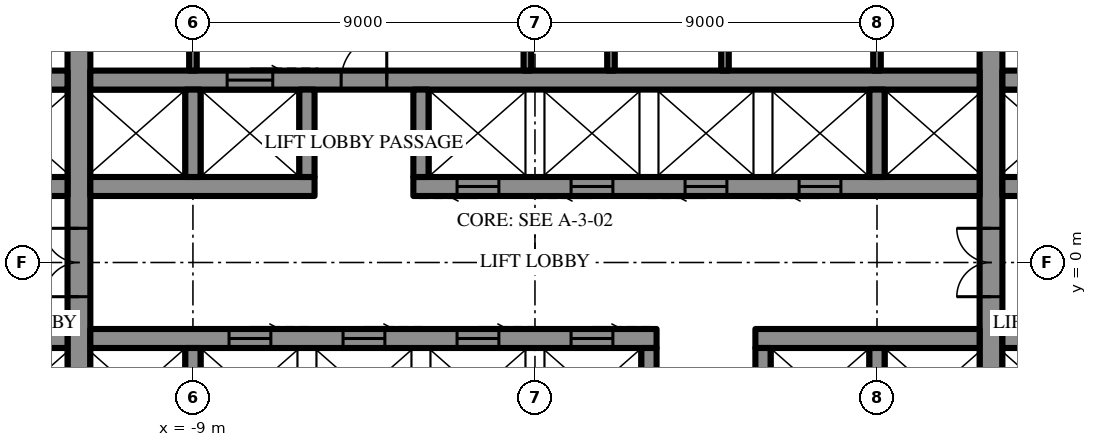
"""IFC4 building model, lengths in metres.
Left out: names, types, materials, properties, quantities, classifications, styles, units other than length and angle.
Written with IfcOpenShell. Run it as: python <this file> out.ifc"""

import sys

from ifc_helpers import new_model, si_unit, direction, frame, frame_2d, origin, place, context, subcontext, project, spatial, rectangle, extrude, element, fill, save


model = new_model("IFC4")
c1 = context("Model", 3, precision=1e-05, world=origin(), true_north=direction((0.0, 1.0)))
c2 = subcontext(c1, "Body", "Model", "MODEL_VIEW")
j1 = project(units=[si_unit("LENGTHUNIT", "METRE"), si_unit("PLANEANGLEUNIT", "RADIAN")], contexts=[c1])
p1 = place(None, origin())
s1 = spatial("IfcSite", under=j1, at=p1, CompositionType="ELEMENT")
p2 = place(p1, origin())
s2 = spatial("IfcBuilding", under=s1, at=p2, CompositionType="ELEMENT")
p3 = place(p2, frame((0.0, 0.0, 119.5)))
s3 = spatial("IfcBuildingStorey", under=s2, at=p3, CompositionType="ELEMENT", Elevation=119.5)
p4 = place(p3, frame((12.0, -10.7, 0.0), z_axis=(0.0, 0.0, 1.0), x_axis=(0.0, 1.0, 0.0)))
e1 = element("IfcWall", 1, at=p4, inside=s3, PredefinedType="SHEAR", context=c2, shape_type="SweptSolid", body=[
    extrude(rectangle(XDim=21.4, YDim=0.6, at=frame_2d((10.7, 0.0))), origin(), (0.0, 0.0, 1.0), 4.2),
])
p5 = place(p4, frame((9.8, 0.0, 0.0)))
e2 = element("IfcOpeningElement", 2, at=p5, cuts=e1, PredefinedType="OPENING", context=c2, shape_type="SweptSolid", body=[
    extrude(rectangle(XDim=1.8, YDim=2.4, at=frame_2d((0.9, 1.2))), frame((0.0, 0.31, 0.0), z_axis=(0.0, -1.0, 0.0), x_axis=(1.0, 0.0, 0.0)), (0.0, 0.0, 1.0), 0.62),
])
p6 = place(p3, frame((-12.0, -10.7, 0.0), z_axis=(0.0, 0.0, 1.0), x_axis=(0.0, 1.0, 0.0)))
e3 = element("IfcWall", 3, at=p6, inside=s3, PredefinedType="SHEAR", context=c2, shape_type="SweptSolid", body=[
    extrude(rectangle(XDim=21.4, YDim=0.6, at=frame_2d((10.7, 0.0))), origin(), (0.0, 0.0, 1.0), 4.2),
])
p7 = place(p6, frame((9.8, 0.0, 0.0)))
e4 = element("IfcOpeningElement", 4, at=p7, cuts=e3, PredefinedType="OPENING", context=c2, shape_type="SweptSolid", body=[
    extrude(rectangle(XDim=1.8, YDim=2.4, at=frame_2d((0.9, 1.2))), frame((0.0, 0.31, 0.0), z_axis=(0.0, -1.0, 0.0), x_axis=(1.0, 0.0, 0.0)), (0.0, 0.0, 1.0), 0.62),
])
p8 = place(p3, frame((-14.7, 2.0, 0.0), z_axis=(0.0, 0.0, 1.0), x_axis=(1.0, 0.0, 0.0)))
e5 = element("IfcWall", 5, at=p8, inside=s3, PredefinedType="SHEAR", context=c2, shape_type="SweptSolid", body=[
    extrude(rectangle(XDim=2.4, YDim=0.5, at=frame_2d((1.2, 0.0))), origin(), (0.0, 0.0, 1.0), 4.2),
])
p9 = place(p3, frame((-11.7, 2.0, 0.0), z_axis=(0.0, 0.0, 1.0), x_axis=(1.0, 0.0, 0.0)))
e6 = element("IfcWall", 6, at=p9, inside=s3, PredefinedType="SHEAR", context=c2, shape_type="SweptSolid", body=[
    extrude(rectangle(XDim=5.9, YDim=0.5, at=frame_2d((2.95, 0.0))), origin(), (0.0, 0.0, 1.0), 4.2),
])
p10 = place(p3, frame((-3.2, 2.0, 0.0), z_axis=(0.0, 0.0, 1.0), x_axis=(1.0, 0.0, 0.0)))
e7 = element("IfcWall", 7, at=p10, inside=s3, PredefinedType="SHEAR", context=c2, shape_type="SweptSolid", body=[
    extrude(rectangle(XDim=14.9, YDim=0.5, at=frame_2d((7.45, 0.0))), origin(), (0.0, 0.0, 1.0), 4.2),
])
p11 = place(p10, frame((1.15, 0.0, 0.0)))
e8 = element("IfcOpeningElement", 8, at=p11, cuts=e7, PredefinedType="OPENING", context=c2, shape_type="SweptSolid", body=[
    extrude(rectangle(XDim=1.1, YDim=2.2, at=frame_2d((0.55, 1.1))), frame((0.0, 0.26, 0.0), z_axis=(0.0, -1.0, 0.0), x_axis=(1.0, 0.0, 0.0)), (0.0, 0.0, 1.0), 0.52),
])
p12 = place(p10, frame((4.15, 0.0, 0.0)))
e9 = element("IfcOpeningElement", 9, at=p12, cuts=e7, PredefinedType="OPENING", context=c2, shape_type="SweptSolid", body=[
    extrude(rectangle(XDim=1.1, YDim=2.2, at=frame_2d((0.55, 1.1))), frame((0.0, 0.26, 0.0), z_axis=(0.0, -1.0, 0.0), x_axis=(1.0, 0.0, 0.0)), (0.0, 0.0, 1.0), 0.52),
])
p13 = place(p10, frame((7.15, 0.0, 0.0)))
e10 = element("IfcOpeningElement", 10, at=p13, cuts=e7, PredefinedType="OPENING", context=c2, shape_type="SweptSolid", body=[
    extrude(rectangle(XDim=1.1, YDim=2.2, at=frame_2d((0.55, 1.1))), frame((0.0, 0.26, 0.0), z_axis=(0.0, -1.0, 0.0), x_axis=(1.0, 0.0, 0.0)), (0.0, 0.0, 1.0), 0.52),
])
p14 = place(p10, frame((10.15, 0.0, 0.0)))
e11 = element("IfcOpeningElement", 11, at=p14, cuts=e7, PredefinedType="OPENING", context=c2, shape_type="SweptSolid", body=[
    extrude(rectangle(XDim=1.1, YDim=2.2, at=frame_2d((0.55, 1.1))), frame((0.0, 0.26, 0.0), z_axis=(0.0, -1.0, 0.0), x_axis=(1.0, 0.0, 0.0)), (0.0, 0.0, 1.0), 0.52),
])
for number, where, z_axis, x_axis in (
    (12, (12.3, 2.0, 0.0), (0.0, 0.0, 1.0), (1.0, 0.0, 0.0)),
    (13, (-14.7, 4.8, 0.0), (0.0, 0.0, 1.0), (1.0, 0.0, 0.0)),
):
    element("IfcWall", number, at=place(p3, frame(where, z_axis=z_axis, x_axis=x_axis)), inside=s3, PredefinedType="SHEAR", context=c2, shape_type="SweptSolid", body=[
        extrude(rectangle(XDim=2.4, YDim=0.5, at=frame_2d((1.2, 0.0))), origin(), (0.0, 0.0, 1.0), 4.2),
    ])
p15 = place(p3, frame((-11.7, 4.8, 0.0), z_axis=(0.0, 0.0, 1.0), x_axis=(1.0, 0.0, 0.0)))
e14 = element("IfcWall", 14, at=p15, inside=s3, PredefinedType="SHEAR", context=c2, shape_type="SweptSolid", body=[
    extrude(rectangle(XDim=23.4, YDim=0.5, at=frame_2d((11.7, 0.0))), origin(), (0.0, 0.0, 1.0), 4.2),
])
p16 = place(p15, frame((6.6, 0.0, 0.0)))
e15 = element("IfcOpeningElement", 15, at=p16, cuts=e14, PredefinedType="OPENING", context=c2, shape_type="SweptSolid", body=[
    extrude(rectangle(XDim=1.2, YDim=2.2, at=frame_2d((0.6, 1.1))), frame((0.0, 0.26, 0.0), z_axis=(0.0, -1.0, 0.0), x_axis=(1.0, 0.0, 0.0)), (0.0, 0.0, 1.0), 0.52),
])
p17 = place(p15, frame((3.6, 0.0, 0.0)))
e16 = element("IfcOpeningElement", 16, at=p17, cuts=e14, PredefinedType="OPENING", context=c2, shape_type="SweptSolid", body=[
    extrude(rectangle(XDim=1.2, YDim=2.2, at=frame_2d((0.6, 1.1))), frame((0.0, 0.26, 0.0), z_axis=(0.0, -1.0, 0.0), x_axis=(1.0, 0.0, 0.0)), (0.0, 0.0, 1.0), 0.52),
])
p18 = place(p3, frame((12.3, 4.8, 0.0), z_axis=(0.0, 0.0, 1.0), x_axis=(1.0, 0.0, 0.0)))
e17 = element("IfcWall", 17, at=p18, inside=s3, PredefinedType="SHEAR", context=c2, shape_type="SweptSolid", body=[
    extrude(rectangle(XDim=2.4, YDim=0.5, at=frame_2d((1.2, 0.0))), origin(), (0.0, 0.0, 1.0), 4.2),
])
for number, where, z_axis, x_axis in (
    (18, (-9.0, 2.25, 0.0), (0.0, 0.0, 1.0), (0.0, 1.0, 0.0)),
    (19, (-6.0, 2.25, 0.0), (0.0, 0.0, 1.0), (0.0, 1.0, 0.0)),
    (20, (-3.0, 2.25, 0.0), (0.0, 0.0, 1.0), (0.0, 1.0, 0.0)),
    (21, (9.0, 2.25, 0.0), (0.0, 0.0, 1.0), (0.0, 1.0, 0.0)),
):
    element("IfcWall", number, at=place(p3, frame(where, z_axis=z_axis, x_axis=x_axis)), inside=s3, PredefinedType="SHEAR", context=c2, shape_type="SweptSolid", body=[
        extrude(rectangle(XDim=2.3, YDim=0.4, at=frame_2d((1.15, 0.0))), origin(), (0.0, 0.0, 1.0), 4.2),
    ])
p19 = place(p3, frame((-0.2, 5.05, 0.0), z_axis=(0.0, 0.0, 1.0), x_axis=(0.0, 1.0, 0.0)))
e22 = element("IfcWall", 22, at=p19, inside=s3, PredefinedType="SHEAR", context=c2, shape_type="SweptSolid", body=[
    extrude(rectangle(XDim=5.65, YDim=0.2, at=frame_2d((2.825, 0.0))), origin(), (0.0, 0.0, 1.0), 4.2),
])
p20 = place(p3, frame((14.7, -2.0, 0.0), z_axis=(0.0, 0.0, 1.0), x_axis=(-1.0, 0.0, 0.0)))
e23 = element("IfcWall", 23, at=p20, inside=s3, PredefinedType="SHEAR", context=c2, shape_type="SweptSolid", body=[
    extrude(rectangle(XDim=2.4, YDim=0.5, at=frame_2d((1.2, 0.0))), origin(), (0.0, 0.0, 1.0), 4.2),
])
p21 = place(p3, frame((11.7, -2.0, 0.0), z_axis=(0.0, 0.0, 1.0), x_axis=(-1.0, 0.0, 0.0)))
e24 = element("IfcWall", 24, at=p21, inside=s3, PredefinedType="SHEAR", context=c2, shape_type="SweptSolid", body=[
    extrude(rectangle(XDim=5.9, YDim=0.5, at=frame_2d((2.95, 0.0))), origin(), (0.0, 0.0, 1.0), 4.2),
])
p22 = place(p3, frame((3.2, -2.0, 0.0), z_axis=(0.0, 0.0, 1.0), x_axis=(-1.0, 0.0, 0.0)))
e25 = element("IfcWall", 25, at=p22, inside=s3, PredefinedType="SHEAR", context=c2, shape_type="SweptSolid", body=[
    extrude(rectangle(XDim=14.9, YDim=0.5, at=frame_2d((7.45, 0.0))), origin(), (0.0, 0.0, 1.0), 4.2),
])
p23 = place(p22, frame((1.15, 0.0, 0.0)))
e26 = element("IfcOpeningElement", 26, at=p23, cuts=e25, PredefinedType="OPENING", context=c2, shape_type="SweptSolid", body=[
    extrude(rectangle(XDim=1.1, YDim=2.2, at=frame_2d((0.55, 1.1))), frame((0.0, 0.26, 0.0), z_axis=(0.0, -1.0, 0.0), x_axis=(1.0, 0.0, 0.0)), (0.0, 0.0, 1.0), 0.52),
])
p24 = place(p22, frame((4.15, 0.0, 0.0)))
e27 = element("IfcOpeningElement", 27, at=p24, cuts=e25, PredefinedType="OPENING", context=c2, shape_type="SweptSolid", body=[
    extrude(rectangle(XDim=1.1, YDim=2.2, at=frame_2d((0.55, 1.1))), frame((0.0, 0.26, 0.0), z_axis=(0.0, -1.0, 0.0), x_axis=(1.0, 0.0, 0.0)), (0.0, 0.0, 1.0), 0.52),
])
p25 = place(p22, frame((7.15, 0.0, 0.0)))
e28 = element("IfcOpeningElement", 28, at=p25, cuts=e25, PredefinedType="OPENING", context=c2, shape_type="SweptSolid", body=[
    extrude(rectangle(XDim=1.1, YDim=2.2, at=frame_2d((0.55, 1.1))), frame((0.0, 0.26, 0.0), z_axis=(0.0, -1.0, 0.0), x_axis=(1.0, 0.0, 0.0)), (0.0, 0.0, 1.0), 0.52),
])
p26 = place(p22, frame((10.15, 0.0, 0.0)))
e29 = element("IfcOpeningElement", 29, at=p26, cuts=e25, PredefinedType="OPENING", context=c2, shape_type="SweptSolid", body=[
    extrude(rectangle(XDim=1.1, YDim=2.2, at=frame_2d((0.55, 1.1))), frame((0.0, 0.26, 0.0), z_axis=(0.0, -1.0, 0.0), x_axis=(1.0, 0.0, 0.0)), (0.0, 0.0, 1.0), 0.52),
])
p27 = place(p3, frame((-12.3, -2.0, 0.0), z_axis=(0.0, 0.0, 1.0), x_axis=(-1.0, 0.0, 0.0)))
e30 = element("IfcWall", 30, at=p27, inside=s3, PredefinedType="SHEAR", context=c2, shape_type="SweptSolid", body=[
    extrude(rectangle(XDim=2.4, YDim=0.5, at=frame_2d((1.2, 0.0))), origin(), (0.0, 0.0, 1.0), 4.2),
])
for number, where, z_axis, x_axis in (
    (31, (9.0, -2.25, 0.0), (0.0, 0.0, 1.0), (0.0, -1.0, 0.0)),
    (32, (6.0, -2.25, 0.0), (0.0, 0.0, 1.0), (0.0, -1.0, 0.0)),
    (33, (3.0, -2.25, 0.0), (0.0, 0.0, 1.0), (0.0, -1.0, 0.0)),
    (34, (-9.0, -2.25, 0.0), (0.0, 0.0, 1.0), (0.0, -1.0, 0.0)),
):
    element("IfcWall", number, at=place(p3, frame(where, z_axis=z_axis, x_axis=x_axis)), inside=s3, PredefinedType="SHEAR", context=c2, shape_type="SweptSolid", body=[
        extrude(rectangle(XDim=2.3, YDim=0.4, at=frame_2d((1.15, 0.0))), origin(), (0.0, 0.0, 1.0), 4.2),
    ])
for number, where, z_axis, x_axis in (
    (35, (-9.0, 5.05, 0.0), (0.0, 0.0, 1.0), (0.0, 1.0, 0.0)),
    (36, (9.0, 5.05, 0.0), (0.0, 0.0, 1.0), (0.0, 1.0, 0.0)),
    (37, (2.0, 5.05, 0.0), (0.0, 0.0, 1.0), (0.0, 1.0, 0.0)),
    (38, (5.0, 5.05, 0.0), (0.0, 0.0, 1.0), (0.0, 1.0, 0.0)),
):
    element("IfcWall", number, at=place(p3, frame(where, z_axis=z_axis, x_axis=x_axis)), inside=s3, PredefinedType="PARTITIONING", context=c2, shape_type="SweptSolid", body=[
        extrude(rectangle(XDim=5.65, YDim=0.2, at=frame_2d((2.825, 0.0))), origin(), (0.0, 0.0, 1.0), 4.0),
    ])
p28 = place(p16, origin())
e39 = element("IfcDoor", 39, at=p28, inside=s3, OperationType="SINGLE_SWING_LEFT", PredefinedType="DOOR", context=c2, shape_type="SweptSolid", body=[
    extrude(rectangle(XDim=1.2, YDim=2.2, at=frame_2d((0.6, 1.1))), frame((0.0, 0.025, 0.0), z_axis=(0.0, -1.0, 0.0), x_axis=(1.0, 0.0, 0.0)), (0.0, 0.0, 1.0), 0.05),
])
fill(e15, e39)
p29 = place(p5, origin())
e40 = element("IfcDoor", 40, at=p29, inside=s3, OperationType="DOUBLE_DOOR_SINGLE_SWING", PredefinedType="DOOR", context=c2, shape_type="SweptSolid", body=[
    extrude(rectangle(XDim=1.8, YDim=2.4, at=frame_2d((0.9, 1.2))), frame((0.0, 0.025, 0.0), z_axis=(0.0, -1.0, 0.0), x_axis=(1.0, 0.0, 0.0)), (0.0, 0.0, 1.0), 0.05),
])
fill(e2, e40)
p30 = place(p7, origin())
e41 = element("IfcDoor", 41, at=p30, inside=s3, OperationType="DOUBLE_DOOR_SINGLE_SWING", PredefinedType="DOOR", context=c2, shape_type="SweptSolid", body=[
    extrude(rectangle(XDim=1.8, YDim=2.4, at=frame_2d((0.9, 1.2))), frame((0.0, 0.025, 0.0), z_axis=(0.0, -1.0, 0.0), x_axis=(1.0, 0.0, 0.0)), (0.0, 0.0, 1.0), 0.05),
])
fill(e4, e41)
p31 = place(p17, origin())
e42 = element("IfcDoor", 42, at=p31, inside=s3, OperationType="SLIDING_TO_LEFT", PredefinedType="DOOR", context=c2, shape_type="SweptSolid", body=[
    extrude(rectangle(XDim=1.2, YDim=2.2, at=frame_2d((0.6, 1.1))), frame((0.0, 0.025, 0.0), z_axis=(0.0, -1.0, 0.0), x_axis=(1.0, 0.0, 0.0)), (0.0, 0.0, 1.0), 0.05),
])
fill(e16, e42)
p32 = place(p11, frame((1.1, 0.0, 0.0), z_axis=(0.0, 0.0, 1.0), x_axis=(-1.0, 0.0, 0.0)))
e43 = element("IfcDoor", 43, at=p32, inside=s3, OperationType="SLIDING_TO_LEFT", PredefinedType="DOOR", context=c2, shape_type="SweptSolid", body=[
    extrude(rectangle(XDim=1.1, YDim=2.2, at=frame_2d((0.55, 1.1))), frame((0.0, 0.025, 0.0), z_axis=(0.0, -1.0, 0.0), x_axis=(1.0, 0.0, 0.0)), (0.0, 0.0, 1.0), 0.05),
])
fill(e8, e43)
p33 = place(p12, frame((1.1, 0.0, 0.0), z_axis=(0.0, 0.0, 1.0), x_axis=(-1.0, 0.0, 0.0)))
e44 = element("IfcDoor", 44, at=p33, inside=s3, OperationType="SLIDING_TO_LEFT", PredefinedType="DOOR", context=c2, shape_type="SweptSolid", body=[
    extrude(rectangle(XDim=1.1, YDim=2.2, at=frame_2d((0.55, 1.1))), frame((0.0, 0.025, 0.0), z_axis=(0.0, -1.0, 0.0), x_axis=(1.0, 0.0, 0.0)), (0.0, 0.0, 1.0), 0.05),
])
fill(e9, e44)
p34 = place(p13, frame((1.1, 0.0, 0.0), z_axis=(0.0, 0.0, 1.0), x_axis=(-1.0, 0.0, 0.0)))
e45 = element("IfcDoor", 45, at=p34, inside=s3, OperationType="SLIDING_TO_LEFT", PredefinedType="DOOR", context=c2, shape_type="SweptSolid", body=[
    extrude(rectangle(XDim=1.1, YDim=2.2, at=frame_2d((0.55, 1.1))), frame((0.0, 0.025, 0.0), z_axis=(0.0, -1.0, 0.0), x_axis=(1.0, 0.0, 0.0)), (0.0, 0.0, 1.0), 0.05),
])
fill(e10, e45)
p35 = place(p14, frame((1.1, 0.0, 0.0), z_axis=(0.0, 0.0, 1.0), x_axis=(-1.0, 0.0, 0.0)))
e46 = element("IfcDoor", 46, at=p35, inside=s3, OperationType="SLIDING_TO_LEFT", PredefinedType="DOOR", context=c2, shape_type="SweptSolid", body=[
    extrude(rectangle(XDim=1.1, YDim=2.2, at=frame_2d((0.55, 1.1))), frame((0.0, 0.025, 0.0), z_axis=(0.0, -1.0, 0.0), x_axis=(1.0, 0.0, 0.0)), (0.0, 0.0, 1.0), 0.05),
])
fill(e11, e46)
p36 = place(p23, frame((1.1, 0.0, 0.0), z_axis=(0.0, 0.0, 1.0), x_axis=(-1.0, 0.0, 0.0)))
e47 = element("IfcDoor", 47, at=p36, inside=s3, OperationType="SLIDING_TO_LEFT", PredefinedType="DOOR", context=c2, shape_type="SweptSolid", body=[
    extrude(rectangle(XDim=1.1, YDim=2.2, at=frame_2d((0.55, 1.1))), frame((0.0, 0.025, 0.0), z_axis=(0.0, -1.0, 0.0), x_axis=(1.0, 0.0, 0.0)), (0.0, 0.0, 1.0), 0.05),
])
fill(e26, e47)
p37 = place(p24, frame((1.1, 0.0, 0.0), z_axis=(0.0, 0.0, 1.0), x_axis=(-1.0, 0.0, 0.0)))
e48 = element("IfcDoor", 48, at=p37, inside=s3, OperationType="SLIDING_TO_LEFT", PredefinedType="DOOR", context=c2, shape_type="SweptSolid", body=[
    extrude(rectangle(XDim=1.1, YDim=2.2, at=frame_2d((0.55, 1.1))), frame((0.0, 0.025, 0.0), z_axis=(0.0, -1.0, 0.0), x_axis=(1.0, 0.0, 0.0)), (0.0, 0.0, 1.0), 0.05),
])
fill(e27, e48)
p38 = place(p25, frame((1.1, 0.0, 0.0), z_axis=(0.0, 0.0, 1.0), x_axis=(-1.0, 0.0, 0.0)))
e49 = element("IfcDoor", 49, at=p38, inside=s3, OperationType="SLIDING_TO_LEFT", PredefinedType="DOOR", context=c2, shape_type="SweptSolid", body=[
    extrude(rectangle(XDim=1.1, YDim=2.2, at=frame_2d((0.55, 1.1))), frame((0.0, 0.025, 0.0), z_axis=(0.0, -1.0, 0.0), x_axis=(1.0, 0.0, 0.0)), (0.0, 0.0, 1.0), 0.05),
])
fill(e28, e49)
p39 = place(p26, frame((1.1, 0.0, 0.0), z_axis=(0.0, 0.0, 1.0), x_axis=(-1.0, 0.0, 0.0)))
e50 = element("IfcDoor", 50, at=p39, inside=s3, OperationType="SLIDING_TO_LEFT", PredefinedType="DOOR", context=c2, shape_type="SweptSolid", body=[
    extrude(rectangle(XDim=1.1, YDim=2.2, at=frame_2d((0.55, 1.1))), frame((0.0, 0.025, 0.0), z_axis=(0.0, -1.0, 0.0), x_axis=(1.0, 0.0, 0.0)), (0.0, 0.0, 1.0), 0.05),
])
fill(e29, e50)
save(model, sys.argv[1])
